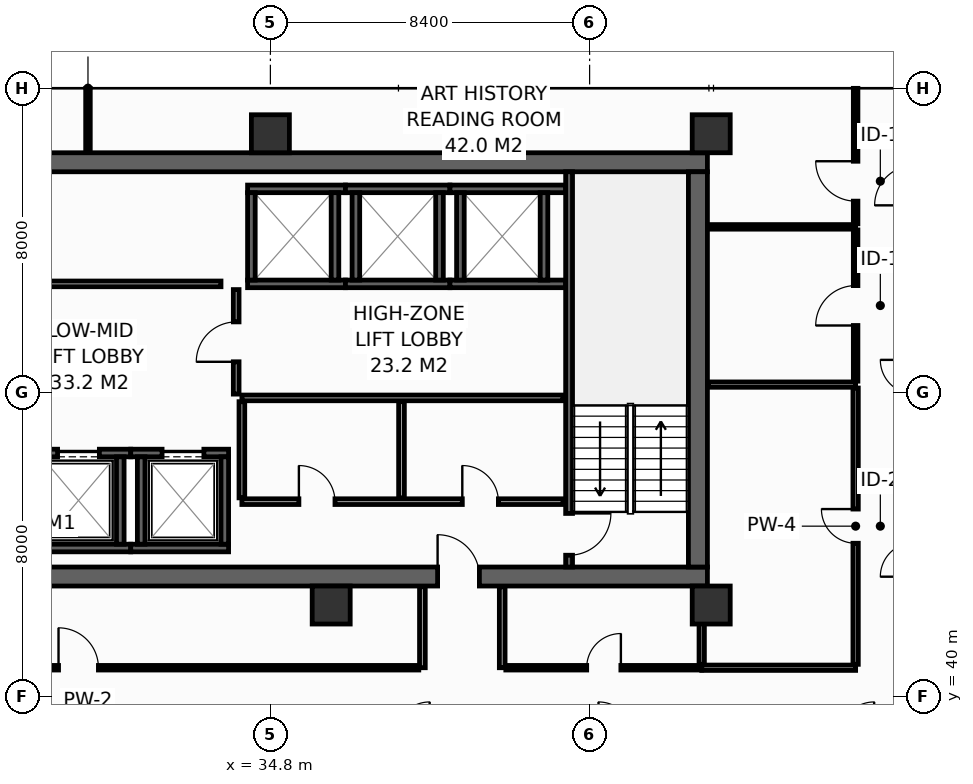
"""IFC4 building model, lengths in metres.
Left out: names, types, materials, properties, quantities, classifications, styles, units other than length and angle.
Written with IfcOpenShell. Run it as: python <this file> out.ifc"""

import sys

from ifc_helpers import new_model, si_unit, direction, frame, frame_2d, origin, origin_2d, place, context, subcontext, project, spatial, rectangle, hollow_rectangle, extrude, element, fill, save


model = new_model("IFC4")
c1 = context("Model", 3, precision=1e-05, world=origin(), true_north=direction((0.0, 1.0)))
c2 = subcontext(c1, "Body", "Model", "MODEL_VIEW")
j1 = project(units=[si_unit("LENGTHUNIT", "METRE"), si_unit("PLANEANGLEUNIT", "RADIAN")], contexts=[c1])
p1 = place(None, origin())
s1 = spatial("IfcSite", under=j1, at=p1, CompositionType="ELEMENT")
p2 = place(p1, origin())
s2 = spatial("IfcBuilding", under=s1, at=p2, CompositionType="ELEMENT")
p3 = place(p2, frame((0.0, 0.0, 129.6)))
s3 = spatial("IfcBuildingStorey", under=s2, at=p3, CompositionType="ELEMENT", Elevation=129.6)
p4 = place(p3, frame((13.6, 43.15, 0.0), z_axis=(0.0, 0.0, 1.0), x_axis=(1.0, 0.0, 0.0)))
e1 = element("IfcWall", 1, at=p4, inside=s3, PredefinedType="SHEAR", context=c2, shape_type="SweptSolid", body=[
    extrude(rectangle(XDim=32.7, YDim=0.5, at=frame_2d((16.35, 0.0))), origin(), (0.0, 0.0, 1.0), 3.55),
])
p5 = place(p4, frame((5.4, 0.0, 0.0)))
e2 = element("IfcOpeningElement", 2, at=p5, cuts=e1, PredefinedType="OPENING", context=c2, shape_type="SweptSolid", body=[
    extrude(rectangle(XDim=1.1, YDim=2.15, at=frame_2d((0.55, 1.075))), frame((0.0, 0.26, 0.0), z_axis=(0.0, -1.0, 0.0), x_axis=(1.0, 0.0, 0.0)), (0.0, 0.0, 1.0), 0.52),
])
p6 = place(p4, frame((25.6, 0.0, 0.0)))
e3 = element("IfcOpeningElement", 3, at=p6, cuts=e1, PredefinedType="OPENING", context=c2, shape_type="SweptSolid", body=[
    extrude(rectangle(XDim=1.1, YDim=2.15, at=frame_2d((0.55, 1.075))), frame((0.0, 0.26, 0.0), z_axis=(0.0, -1.0, 0.0), x_axis=(1.0, 0.0, 0.0)), (0.0, 0.0, 1.0), 0.52),
])
p7 = place(p3, frame((13.6, 54.05, 0.0), z_axis=(0.0, 0.0, 1.0), x_axis=(1.0, 0.0, 0.0)))
e4 = element("IfcWall", 4, at=p7, inside=s3, PredefinedType="SHEAR", context=c2, shape_type="SweptSolid", body=[
    extrude(rectangle(XDim=32.7, YDim=0.5, at=frame_2d((16.35, 0.0))), origin(), (0.0, 0.0, 1.0), 3.55),
])
p8 = place(p3, frame((46.05, 43.4, 0.0), z_axis=(0.0, 0.0, 1.0), x_axis=(0.0, 1.0, 0.0)))
e5 = element("IfcWall", 5, at=p8, inside=s3, PredefinedType="SHEAR", context=c2, shape_type="SweptSolid", body=[
    extrude(rectangle(XDim=10.4, YDim=0.5, at=frame_2d((5.2, 0.0))), origin(), (0.0, 0.0, 1.0), 3.55),
])
for number, where, z_axis, x_axis in (
    (6, (34.8, 54.8, 0.0), (0.0, 0.0, 1.0), (1.0, 0.0, 0.0)),
    (7, (46.4, 54.8, 0.0), (0.0, 0.0, 1.0), (1.0, 0.0, 0.0)),
    (8, (36.4, 42.4, 0.0), (0.0, 0.0, 1.0), (1.0, 0.0, 0.0)),
    (9, (46.4, 42.4, 0.0), (0.0, 0.0, 1.0), (1.0, 0.0, 0.0)),
):
    element("IfcColumn", number, at=place(p3, frame(where, z_axis=z_axis, x_axis=x_axis)), inside=s3, PredefinedType="COLUMN", context=c2, shape_type="SweptSolid", body=[
        extrude(hollow_rectangle(XDim=1.0, YDim=1.0, WallThickness=0.045, at=origin_2d()), origin(), (0.0, 0.0, 1.0), 3.8),
    ])
p9 = place(p3, frame((28.375, 43.9, 0.0), z_axis=(0.0, 0.0, 1.0), x_axis=(1.0, 0.0, 0.0)))
e10 = element("IfcWall", 10, at=p9, inside=s3, PredefinedType="SHEAR", context=c2, shape_type="SweptSolid", body=[
    extrude(rectangle(XDim=2.75, YDim=0.2, at=frame_2d((1.375, 0.0))), origin(), (0.0, 0.0, 1.0), 3.55),
])
p10 = place(p3, frame((28.375, 46.4, 0.0), z_axis=(0.0, 0.0, 1.0), x_axis=(1.0, 0.0, 0.0)))
e11 = element("IfcWall", 11, at=p10, inside=s3, PredefinedType="SHEAR", context=c2, shape_type="SweptSolid", body=[
    extrude(rectangle(XDim=2.75, YDim=0.2, at=frame_2d((1.375, 0.0))), origin(), (0.0, 0.0, 1.0), 3.55),
])
p11 = place(p10, frame((0.825, 0.0, 0.0)))
e12 = element("IfcOpeningElement", 12, at=p11, cuts=e11, PredefinedType="OPENING", context=c2, shape_type="SweptSolid", body=[
    extrude(rectangle(XDim=1.1, YDim=2.2, at=frame_2d((0.55, 1.1))), frame((0.0, 0.11, 0.0), z_axis=(0.0, -1.0, 0.0), x_axis=(1.0, 0.0, 0.0)), (0.0, 0.0, 1.0), 0.22),
])
p12 = place(p3, frame((30.85, 44.0, 0.0), z_axis=(0.0, 0.0, 1.0), x_axis=(0.0, 1.0, 0.0)))
e13 = element("IfcWall", 13, at=p12, inside=s3, PredefinedType="SHEAR", context=c2, shape_type="SweptSolid", body=[
    extrude(rectangle(XDim=2.3, YDim=0.2, at=frame_2d((1.15, 0.0))), origin(), (0.0, 0.0, 1.0), 3.55),
])
p13 = place(p3, frame((31.125, 43.9, 0.0), z_axis=(0.0, 0.0, 1.0), x_axis=(1.0, 0.0, 0.0)))
e14 = element("IfcWall", 14, at=p13, inside=s3, PredefinedType="SHEAR", context=c2, shape_type="SweptSolid", body=[
    extrude(rectangle(XDim=2.575, YDim=0.2, at=frame_2d((1.288, 0.0))), origin(), (0.0, 0.0, 1.0), 3.55),
])
p14 = place(p3, frame((31.125, 46.4, 0.0), z_axis=(0.0, 0.0, 1.0), x_axis=(1.0, 0.0, 0.0)))
e15 = element("IfcWall", 15, at=p14, inside=s3, PredefinedType="SHEAR", context=c2, shape_type="SweptSolid", body=[
    extrude(rectangle(XDim=2.575, YDim=0.2, at=frame_2d((1.288, 0.0))), origin(), (0.0, 0.0, 1.0), 3.55),
])
p15 = place(p14, frame((0.825, 0.0, 0.0)))
e16 = element("IfcOpeningElement", 16, at=p15, cuts=e15, PredefinedType="OPENING", context=c2, shape_type="SweptSolid", body=[
    extrude(rectangle(XDim=1.1, YDim=2.2, at=frame_2d((0.55, 1.1))), frame((0.0, 0.11, 0.0), z_axis=(0.0, -1.0, 0.0), x_axis=(1.0, 0.0, 0.0)), (0.0, 0.0, 1.0), 0.22),
])
for number, where, z_axis, x_axis in (
    (17, (31.4, 44.0, 0.0), (0.0, 0.0, 1.0), (0.0, 1.0, 0.0)),
    (18, (33.6, 44.0, 0.0), (0.0, 0.0, 1.0), (0.0, 1.0, 0.0)),
):
    element("IfcWall", number, at=place(p3, frame(where, z_axis=z_axis, x_axis=x_axis)), inside=s3, PredefinedType="SHEAR", context=c2, shape_type="SweptSolid", body=[
        extrude(rectangle(XDim=2.3, YDim=0.2, at=frame_2d((1.15, 0.0))), origin(), (0.0, 0.0, 1.0), 3.55),
    ])
for number, where, z_axis, x_axis in (
    (19, (34.2, 50.85, 0.0), (0.0, 0.0, 1.0), (1.0, 0.0, 0.0)),
    (20, (34.2, 53.35, 0.0), (0.0, 0.0, 1.0), (1.0, 0.0, 0.0)),
):
    element("IfcWall", number, at=place(p3, frame(where, z_axis=z_axis, x_axis=x_axis)), inside=s3, PredefinedType="SHEAR", context=c2, shape_type="SweptSolid", body=[
        extrude(rectangle(XDim=2.575, YDim=0.2, at=frame_2d((1.288, 0.0))), origin(), (0.0, 0.0, 1.0), 3.55),
    ])
for number, where, z_axis, x_axis in (
    (21, (34.3, 50.95, 0.0), (0.0, 0.0, 1.0), (0.0, 1.0, 0.0)),
    (22, (36.5, 50.95, 0.0), (0.0, 0.0, 1.0), (0.0, 1.0, 0.0)),
):
    element("IfcWall", number, at=place(p3, frame(where, z_axis=z_axis, x_axis=x_axis)), inside=s3, PredefinedType="SHEAR", context=c2, shape_type="SweptSolid", body=[
        extrude(rectangle(XDim=2.3, YDim=0.2, at=frame_2d((1.15, 0.0))), origin(), (0.0, 0.0, 1.0), 3.55),
    ])
for number, where, z_axis, x_axis in (
    (23, (36.775, 50.85, 0.0), (0.0, 0.0, 1.0), (1.0, 0.0, 0.0)),
    (24, (36.775, 53.35, 0.0), (0.0, 0.0, 1.0), (1.0, 0.0, 0.0)),
):
    element("IfcWall", number, at=place(p3, frame(where, z_axis=z_axis, x_axis=x_axis)), inside=s3, PredefinedType="SHEAR", context=c2, shape_type="SweptSolid", body=[
        extrude(rectangle(XDim=2.75, YDim=0.2, at=frame_2d((1.375, 0.0))), origin(), (0.0, 0.0, 1.0), 3.55),
    ])
for number, where, z_axis, x_axis in (
    (25, (37.05, 50.95, 0.0), (0.0, 0.0, 1.0), (0.0, 1.0, 0.0)),
    (26, (39.25, 50.95, 0.0), (0.0, 0.0, 1.0), (0.0, 1.0, 0.0)),
):
    element("IfcWall", number, at=place(p3, frame(where, z_axis=z_axis, x_axis=x_axis)), inside=s3, PredefinedType="SHEAR", context=c2, shape_type="SweptSolid", body=[
        extrude(rectangle(XDim=2.3, YDim=0.2, at=frame_2d((1.15, 0.0))), origin(), (0.0, 0.0, 1.0), 3.55),
    ])
for number, where, z_axis, x_axis in (
    (27, (39.525, 50.85, 0.0), (0.0, 0.0, 1.0), (1.0, 0.0, 0.0)),
    (28, (39.525, 53.35, 0.0), (0.0, 0.0, 1.0), (1.0, 0.0, 0.0)),
):
    element("IfcWall", number, at=place(p3, frame(where, z_axis=z_axis, x_axis=x_axis)), inside=s3, PredefinedType="SHEAR", context=c2, shape_type="SweptSolid", body=[
        extrude(rectangle(XDim=3.045, YDim=0.2, at=frame_2d((1.522, 0.0))), origin(), (0.0, 0.0, 1.0), 3.55),
    ])
for number, where, z_axis, x_axis in (
    (29, (39.8, 50.95, 0.0), (0.0, 0.0, 1.0), (0.0, 1.0, 0.0)),
    (30, (42.0, 50.95, 0.0), (0.0, 0.0, 1.0), (0.0, 1.0, 0.0)),
):
    element("IfcWall", number, at=place(p3, frame(where, z_axis=z_axis, x_axis=x_axis)), inside=s3, PredefinedType="SHEAR", context=c2, shape_type="SweptSolid", body=[
        extrude(rectangle(XDim=2.3, YDim=0.2, at=frame_2d((1.15, 0.0))), origin(), (0.0, 0.0, 1.0), 3.55),
    ])
p16 = place(p3, frame((42.66, 53.8, 0.0), z_axis=(0.0, 0.0, 1.0), x_axis=(0.0, -1.0, 0.0)))
e31 = element("IfcWall", 31, at=p16, inside=s3, PredefinedType="SHEAR", context=c2, shape_type="SweptSolid", body=[
    extrude(rectangle(XDim=10.4, YDim=0.18, at=frame_2d((5.2, 0.0))), origin(), (0.0, 0.0, 1.0), 3.55),
])
p17 = place(p16, frame((8.99, 0.0, 0.0)))
e32 = element("IfcOpeningElement", 32, at=p17, cuts=e31, PredefinedType="OPENING", context=c2, shape_type="SweptSolid", body=[
    extrude(rectangle(XDim=1.1, YDim=2.15, at=frame_2d((0.55, 1.075))), frame((0.0, 0.1, 0.0), z_axis=(0.0, -1.0, 0.0), x_axis=(1.0, 0.0, 0.0)), (0.0, 0.0, 1.0), 0.2),
])
p18 = place(p3, frame((33.9, 47.95, 0.0), z_axis=(0.0, 0.0, 1.0), x_axis=(0.0, 1.0, 0.0)))
e33 = element("IfcWall", 33, at=p18, inside=s3, PredefinedType="PARTITIONING", context=c2, shape_type="SweptSolid", body=[
    extrude(rectangle(XDim=2.75, YDim=0.15, at=frame_2d((1.375, 0.0))), origin(), (0.0, 0.0, 1.0), 3.55),
])
p19 = place(p18, frame((0.85, 0.0, 0.0)))
e34 = element("IfcOpeningElement", 34, at=p19, cuts=e33, PredefinedType="OPENING", context=c2, shape_type="SweptSolid", body=[
    extrude(rectangle(XDim=1.05, YDim=2.15, at=frame_2d((0.525, 1.075))), frame((0.0, 0.085, 0.0), z_axis=(0.0, -1.0, 0.0), x_axis=(1.0, 0.0, 0.0)), (0.0, 0.0, 1.0), 0.17),
])
p20 = place(p3, frame((34.05, 45.12, 0.0), z_axis=(0.0, 0.0, 1.0), x_axis=(1.0, 0.0, 0.0)))
e35 = element("IfcWall", 35, at=p20, inside=s3, PredefinedType="PARTITIONING", context=c2, shape_type="SweptSolid", body=[
    extrude(rectangle(XDim=8.45, YDim=0.15, at=frame_2d((4.225, 0.0))), origin(), (0.0, 0.0, 1.0), 3.55),
])
p21 = place(p20, frame((1.5, 0.0, 0.0)))
e36 = element("IfcOpeningElement", 36, at=p21, cuts=e35, PredefinedType="OPENING", context=c2, shape_type="SweptSolid", body=[
    extrude(rectangle(XDim=0.95, YDim=2.15, at=frame_2d((0.475, 1.075))), frame((0.0, 0.085, 0.0), z_axis=(0.0, -1.0, 0.0), x_axis=(1.0, 0.0, 0.0)), (0.0, 0.0, 1.0), 0.17),
])
p22 = place(p20, frame((5.8, 0.0, 0.0)))
e37 = element("IfcOpeningElement", 37, at=p22, cuts=e35, PredefinedType="OPENING", context=c2, shape_type="SweptSolid", body=[
    extrude(rectangle(XDim=0.95, YDim=2.15, at=frame_2d((0.475, 1.075))), frame((0.0, 0.085, 0.0), z_axis=(0.0, -1.0, 0.0), x_axis=(1.0, 0.0, 0.0)), (0.0, 0.0, 1.0), 0.17),
])
p23 = place(p3, frame((34.05, 47.85, 0.0), z_axis=(0.0, 0.0, 1.0), x_axis=(1.0, 0.0, 0.0)))
e38 = element("IfcWall", 38, at=p23, inside=s3, PredefinedType="PARTITIONING", context=c2, shape_type="SweptSolid", body=[
    extrude(rectangle(XDim=8.45, YDim=0.15, at=frame_2d((4.225, 0.0))), origin(), (0.0, 0.0, 1.0), 3.55),
])
for number, where, z_axis, x_axis in (
    (39, (38.25, 45.22, 0.0), (0.0, 0.0, 1.0), (0.0, 1.0, 0.0)),
    (40, (34.05, 45.22, 0.0), (0.0, 0.0, 1.0), (0.0, 1.0, 0.0)),
):
    element("IfcWall", number, at=place(p3, frame(where, z_axis=z_axis, x_axis=x_axis)), inside=s3, PredefinedType="PARTITIONING", context=c2, shape_type="SweptSolid", body=[
        extrude(rectangle(XDim=2.53, YDim=0.15, at=frame_2d((1.265, 0.0))), origin(), (0.0, 0.0, 1.0), 3.55),
    ])
p24 = place(p3, frame((25.85, 50.85, 0.0), z_axis=(0.0, 0.0, 1.0), x_axis=(1.0, 0.0, 0.0)))
e41 = element("IfcWall", 41, at=p24, inside=s3, PredefinedType="PARTITIONING", context=c2, shape_type="SweptSolid", body=[
    extrude(rectangle(XDim=7.65, YDim=0.15, at=frame_2d((3.825, 0.0))), origin(), (0.0, 0.0, 1.0), 3.55),
])
p25 = place(p24, frame((1.25, 0.0, 0.0)))
e42 = element("IfcOpeningElement", 42, at=p25, cuts=e41, PredefinedType="OPENING", context=c2, shape_type="SweptSolid", body=[
    extrude(rectangle(XDim=0.95, YDim=2.15, at=frame_2d((0.475, 1.075))), frame((0.0, 0.085, 0.0), z_axis=(0.0, -1.0, 0.0), x_axis=(1.0, 0.0, 0.0)), (0.0, 0.0, 1.0), 0.17),
])
p26 = place(p3, frame((46.15, 40.75, 0.0), z_axis=(0.0, 0.0, 1.0), x_axis=(1.0, 0.0, 0.0)))
e43 = element("IfcWall", 43, at=p26, inside=s3, PredefinedType="PARTITIONING", context=c2, shape_type="SweptSolid", body=[
    extrude(rectangle(XDim=4.05, YDim=0.14, at=frame_2d((2.025, 0.0))), origin(), (0.0, 0.0, 1.0), 3.55),
])
p27 = place(p3, frame((46.15, 40.84, 0.0), z_axis=(0.0, 0.0, 1.0), x_axis=(0.0, 1.0, 0.0)))
e44 = element("IfcWall", 44, at=p27, inside=s3, PredefinedType="PARTITIONING", context=c2, shape_type="SweptSolid", body=[
    extrude(rectangle(XDim=2.04, YDim=0.14, at=frame_2d((1.02, 0.0))), origin(), (0.0, 0.0, 1.0), 3.55),
])
p28 = place(p3, frame((46.32, 48.2, 0.0), z_axis=(0.0, 0.0, 1.0), x_axis=(1.0, 0.0, 0.0)))
e45 = element("IfcWall", 45, at=p28, inside=s3, PredefinedType="PARTITIONING", context=c2, shape_type="SweptSolid", body=[
    extrude(rectangle(XDim=3.88, YDim=0.14, at=frame_2d((1.94, 0.0))), origin(), (0.0, 0.0, 1.0), 3.55),
])
p29 = place(p3, frame((50.2, 40.84, 0.0), z_axis=(0.0, 0.0, 1.0), x_axis=(0.0, 1.0, 0.0)))
e46 = element("IfcWall", 46, at=p29, inside=s3, PredefinedType="PARTITIONING", context=c2, shape_type="SweptSolid", body=[
    extrude(rectangle(XDim=7.27, YDim=0.14, at=frame_2d((3.635, 0.0))), origin(), (0.0, 0.0, 1.0), 2.835),
])
p30 = place(p29, frame((3.185, 0.0, 0.0)))
e47 = element("IfcOpeningElement", 47, at=p30, cuts=e46, PredefinedType="OPENING", context=c2, shape_type="SweptSolid", body=[
    extrude(rectangle(XDim=0.9, YDim=2.1, at=frame_2d((0.45, 1.05))), frame((0.0, 0.08, 0.0), z_axis=(0.0, -1.0, 0.0), x_axis=(1.0, 0.0, 0.0)), (0.0, 0.0, 1.0), 0.16),
])
p31 = place(p3, frame((46.32, 52.35, 0.0), z_axis=(0.0, 0.0, 1.0), x_axis=(1.0, 0.0, 0.0)))
e48 = element("IfcWall", 48, at=p31, inside=s3, PredefinedType="PARTITIONING", context=c2, shape_type="SweptSolid", body=[
    extrude(rectangle(XDim=3.88, YDim=0.12, at=frame_2d((1.94, 0.0))), origin(), (0.0, 0.0, 1.0), 3.55),
])
p32 = place(p3, frame((30.0, 54.32, 0.0), z_axis=(0.0, 0.0, 1.0), x_axis=(0.0, 1.0, 0.0)))
e49 = element("IfcWall", 49, at=p32, inside=s3, PredefinedType="PARTITIONING", context=c2, shape_type="SweptSolid", body=[
    extrude(rectangle(XDim=1.675, YDim=0.12, at=frame_2d((0.837, 0.0))), origin(), (0.0, 0.0, 1.0), 2.935),
])
p33 = place(p3, frame((50.2, 48.29, 0.0), z_axis=(0.0, 0.0, 1.0), x_axis=(0.0, 1.0, 0.0)))
e50 = element("IfcWall", 50, at=p33, inside=s3, PredefinedType="PARTITIONING", context=c2, shape_type="SweptSolid", body=[
    extrude(rectangle(XDim=3.98, YDim=0.12, at=frame_2d((1.99, 0.0))), origin(), (0.0, 0.0, 1.0), 3.55),
])
p34 = place(p33, frame((1.465, 0.0, 0.0)))
e51 = element("IfcOpeningElement", 51, at=p34, cuts=e50, PredefinedType="OPENING", context=c2, shape_type="SweptSolid", body=[
    extrude(rectangle(XDim=1.05, YDim=2.15, at=frame_2d((0.525, 1.075))), frame((0.0, 0.07, 0.0), z_axis=(0.0, -1.0, 0.0), x_axis=(1.0, 0.0, 0.0)), (0.0, 0.0, 1.0), 0.14),
])
p35 = place(p3, frame((50.2, 52.43, 0.0), z_axis=(0.0, 0.0, 1.0), x_axis=(0.0, 1.0, 0.0)))
e52 = element("IfcWall", 52, at=p35, inside=s3, PredefinedType="PARTITIONING", context=c2, shape_type="SweptSolid", body=[
    extrude(rectangle(XDim=3.565, YDim=0.12, at=frame_2d((1.783, 0.0))), origin(), (0.0, 0.0, 1.0), 2.935),
])
p36 = place(p35, frame((0.597, 0.0, 0.0)))
e53 = element("IfcOpeningElement", 53, at=p36, cuts=e52, PredefinedType="OPENING", context=c2, shape_type="SweptSolid", body=[
    extrude(rectangle(XDim=1.05, YDim=2.15, at=frame_2d((0.525, 1.075))), frame((0.0, 0.07, 0.0), z_axis=(0.0, -1.0, 0.0), x_axis=(1.0, 0.0, 0.0)), (0.0, 0.0, 1.0), 0.14),
])
for number, where, z_axis, x_axis in (
    (54, (38.8, 40.75, 0.0), (0.0, 0.0, 1.0), (0.0, 1.0, 0.0)),
    (55, (40.9, 40.75, 0.0), (0.0, 0.0, 1.0), (0.0, 1.0, 0.0)),
):
    element("IfcWall", number, at=place(p3, frame(where, z_axis=z_axis, x_axis=x_axis)), inside=s3, PredefinedType="PARTITIONING", context=c2, shape_type="SweptSolid", body=[
        extrude(rectangle(XDim=2.13, YDim=0.15, at=frame_2d((1.065, 0.0))), origin(), (0.0, 0.0, 1.0), 3.55),
    ])
p37 = place(p3, frame((20.795, 40.75, 0.0), z_axis=(0.0, 0.0, 1.0), x_axis=(1.0, 0.0, 0.0)))
e56 = element("IfcWall", 56, at=p37, inside=s3, PredefinedType="PARTITIONING", context=c2, shape_type="SweptSolid", body=[
    extrude(rectangle(XDim=17.91, YDim=0.12, at=frame_2d((8.955, 0.0))), origin(), (0.0, 0.0, 1.0), 2.835),
])
p38 = place(p37, frame((8.43, 0.0, 0.0)))
e57 = element("IfcOpeningElement", 57, at=p38, cuts=e56, PredefinedType="OPENING", context=c2, shape_type="SweptSolid", body=[
    extrude(rectangle(XDim=1.05, YDim=2.15, at=frame_2d((0.525, 1.075))), frame((0.0, 0.07, 0.0), z_axis=(0.0, -1.0, 0.0), x_axis=(1.0, 0.0, 0.0)), (0.0, 0.0, 1.0), 0.14),
])
p39 = place(p3, frame((40.995, 40.75, 0.0), z_axis=(0.0, 0.0, 1.0), x_axis=(1.0, 0.0, 0.0)))
e58 = element("IfcWall", 58, at=p39, inside=s3, PredefinedType="PARTITIONING", context=c2, shape_type="SweptSolid", body=[
    extrude(rectangle(XDim=5.155, YDim=0.12, at=frame_2d((2.577, 0.0))), origin(), (0.0, 0.0, 1.0), 3.55),
])
p40 = place(p39, frame((2.128, 0.0, 0.0)))
e59 = element("IfcOpeningElement", 59, at=p40, cuts=e58, PredefinedType="OPENING", context=c2, shape_type="SweptSolid", body=[
    extrude(rectangle(XDim=0.9, YDim=2.1, at=frame_2d((0.45, 1.05))), frame((0.0, 0.07, 0.0), z_axis=(0.0, -1.0, 0.0), x_axis=(1.0, 0.0, 0.0)), (0.0, 0.0, 1.0), 0.14),
])
p41 = place(p11, origin())
e60 = element("IfcDoor", 60, at=p41, inside=s3, OperationType="SLIDING_TO_LEFT", PredefinedType="DOOR", context=c2, shape_type="SweptSolid", body=[
    extrude(rectangle(XDim=1.1, YDim=2.2, at=frame_2d((0.55, 1.1))), frame((0.0, 0.025, 0.0), z_axis=(0.0, -1.0, 0.0), x_axis=(1.0, 0.0, 0.0)), (0.0, 0.0, 1.0), 0.05),
])
fill(e12, e60)
p42 = place(p15, origin())
e61 = element("IfcDoor", 61, at=p42, inside=s3, OperationType="SLIDING_TO_LEFT", PredefinedType="DOOR", context=c2, shape_type="SweptSolid", body=[
    extrude(rectangle(XDim=1.1, YDim=2.2, at=frame_2d((0.55, 1.1))), frame((0.0, 0.025, 0.0), z_axis=(0.0, -1.0, 0.0), x_axis=(1.0, 0.0, 0.0)), (0.0, 0.0, 1.0), 0.05),
])
fill(e16, e61)
p43 = place(p17, origin())
e62 = element("IfcDoor", 62, at=p43, inside=s3, OperationType="SINGLE_SWING_LEFT", PredefinedType="DOOR", context=c2, shape_type="SweptSolid", body=[
    extrude(rectangle(XDim=1.1, YDim=2.15, at=frame_2d((0.55, 1.075))), frame((0.0, 0.025, 0.0), z_axis=(0.0, -1.0, 0.0), x_axis=(1.0, 0.0, 0.0)), (0.0, 0.0, 1.0), 0.05),
])
fill(e32, e62)
p44 = place(p6, origin())
e63 = element("IfcDoor", 63, at=p44, inside=s3, OperationType="SINGLE_SWING_LEFT", PredefinedType="DOOR", context=c2, shape_type="SweptSolid", body=[
    extrude(rectangle(XDim=1.1, YDim=2.15, at=frame_2d((0.55, 1.075))), frame((0.0, 0.025, 0.0), z_axis=(0.0, -1.0, 0.0), x_axis=(1.0, 0.0, 0.0)), (0.0, 0.0, 1.0), 0.05),
])
fill(e3, e63)
p45 = place(p19, origin())
e64 = element("IfcDoor", 64, at=p45, inside=s3, OperationType="SINGLE_SWING_LEFT", PredefinedType="DOOR", context=c2, shape_type="SweptSolid", body=[
    extrude(rectangle(XDim=1.05, YDim=2.15, at=frame_2d((0.525, 1.075))), frame((0.0, 0.025, 0.0), z_axis=(0.0, -1.0, 0.0), x_axis=(1.0, 0.0, 0.0)), (0.0, 0.0, 1.0), 0.05),
])
fill(e34, e64)
p46 = place(p21, origin())
e65 = element("IfcDoor", 65, at=p46, inside=s3, OperationType="SINGLE_SWING_LEFT", PredefinedType="DOOR", context=c2, shape_type="SweptSolid", body=[
    extrude(rectangle(XDim=0.95, YDim=2.15, at=frame_2d((0.475, 1.075))), frame((0.0, 0.025, 0.0), z_axis=(0.0, -1.0, 0.0), x_axis=(1.0, 0.0, 0.0)), (0.0, 0.0, 1.0), 0.05),
])
fill(e36, e65)
p47 = place(p22, origin())
e66 = element("IfcDoor", 66, at=p47, inside=s3, OperationType="SINGLE_SWING_LEFT", PredefinedType="DOOR", context=c2, shape_type="SweptSolid", body=[
    extrude(rectangle(XDim=0.95, YDim=2.15, at=frame_2d((0.475, 1.075))), frame((0.0, 0.025, 0.0), z_axis=(0.0, -1.0, 0.0), x_axis=(1.0, 0.0, 0.0)), (0.0, 0.0, 1.0), 0.05),
])
fill(e37, e66)
p48 = place(p30, origin())
e67 = element("IfcDoor", 67, at=p48, inside=s3, OperationType="SINGLE_SWING_RIGHT", PredefinedType="DOOR", context=c2, shape_type="SweptSolid", body=[
    extrude(rectangle(XDim=0.9, YDim=2.1, at=frame_2d((0.45, 1.05))), frame((0.0, 0.025, 0.0), z_axis=(0.0, -1.0, 0.0), x_axis=(1.0, 0.0, 0.0)), (0.0, 0.0, 1.0), 0.05),
])
fill(e47, e67)
p49 = place(p34, origin())
e68 = element("IfcDoor", 68, at=p49, inside=s3, OperationType="SINGLE_SWING_LEFT", PredefinedType="DOOR", context=c2, shape_type="SweptSolid", body=[
    extrude(rectangle(XDim=1.05, YDim=2.15, at=frame_2d((0.525, 1.075))), frame((0.0, 0.025, 0.0), z_axis=(0.0, -1.0, 0.0), x_axis=(1.0, 0.0, 0.0)), (0.0, 0.0, 1.0), 0.05),
])
fill(e51, e68)
p50 = place(p36, origin())
e69 = element("IfcDoor", 69, at=p50, inside=s3, OperationType="SINGLE_SWING_RIGHT", PredefinedType="DOOR", context=c2, shape_type="SweptSolid", body=[
    extrude(rectangle(XDim=1.05, YDim=2.15, at=frame_2d((0.525, 1.075))), frame((0.0, 0.025, 0.0), z_axis=(0.0, -1.0, 0.0), x_axis=(1.0, 0.0, 0.0)), (0.0, 0.0, 1.0), 0.05),
])
fill(e53, e69)
p51 = place(p38, origin())
e70 = element("IfcDoor", 70, at=p51, inside=s3, OperationType="SINGLE_SWING_LEFT", PredefinedType="DOOR", context=c2, shape_type="SweptSolid", body=[
    extrude(rectangle(XDim=1.05, YDim=2.15, at=frame_2d((0.525, 1.075))), frame((0.0, 0.025, 0.0), z_axis=(0.0, -1.0, 0.0), x_axis=(1.0, 0.0, 0.0)), (0.0, 0.0, 1.0), 0.05),
])
fill(e57, e70)
p52 = place(p40, origin())
e71 = element("IfcDoor", 71, at=p52, inside=s3, OperationType="SINGLE_SWING_RIGHT", PredefinedType="DOOR", context=c2, shape_type="SweptSolid", body=[
    extrude(rectangle(XDim=0.9, YDim=2.1, at=frame_2d((0.45, 1.05))), frame((0.0, 0.025, 0.0), z_axis=(0.0, -1.0, 0.0), x_axis=(1.0, 0.0, 0.0)), (0.0, 0.0, 1.0), 0.05),
])
fill(e59, e71)
save(model, sys.argv[1])
